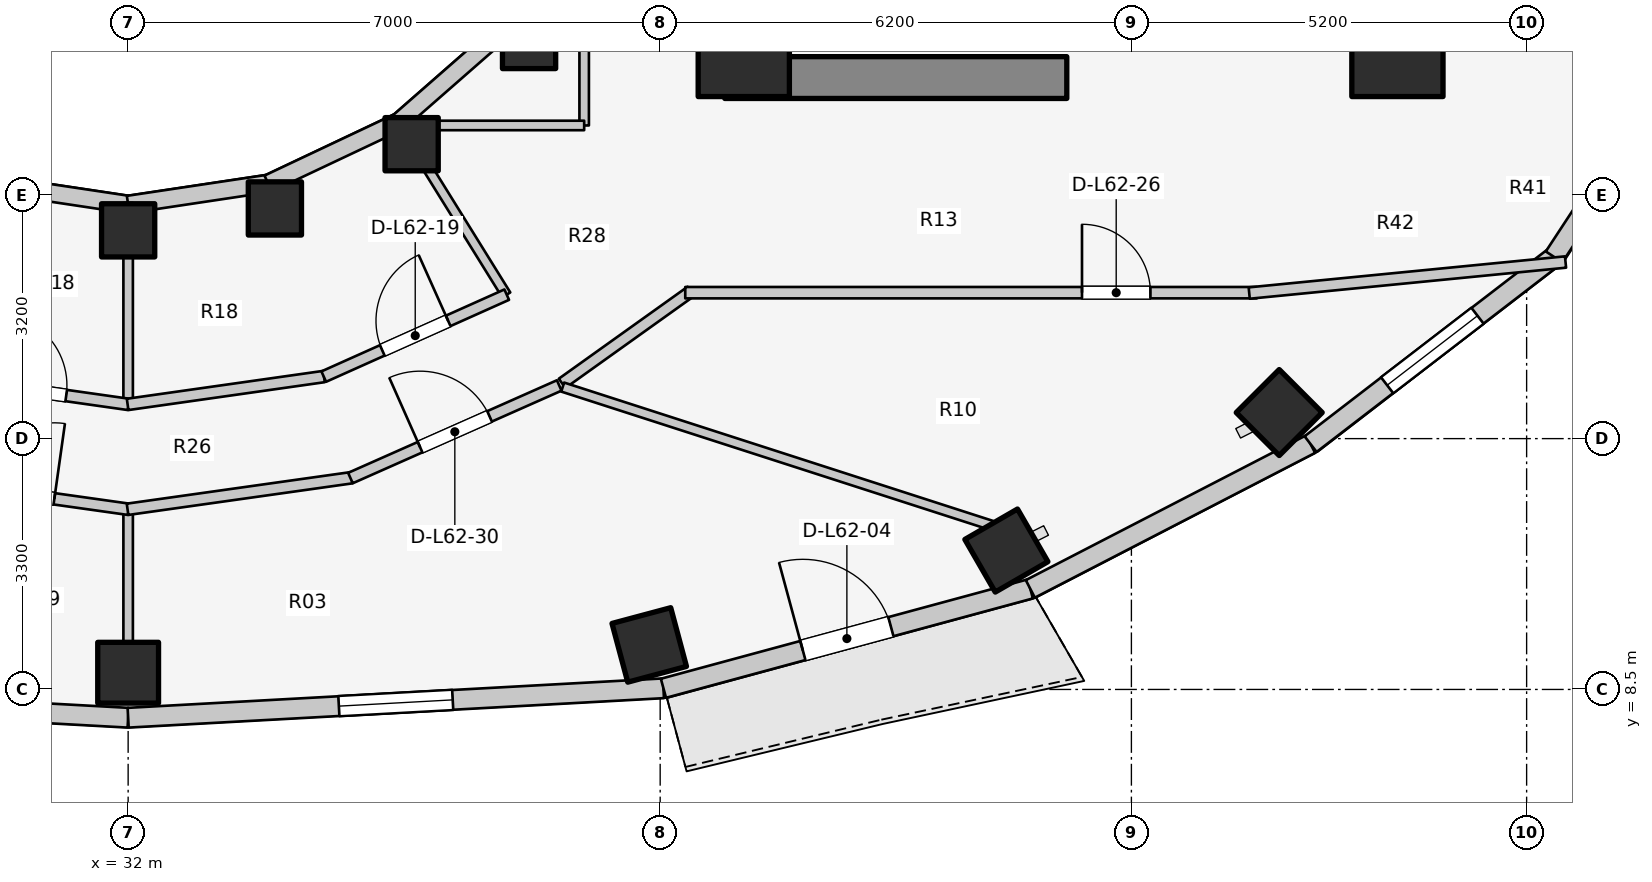
"""IFC4 building model, lengths in metres.
Left out: names, types, materials, properties, quantities, classifications, styles, units other than length and angle.
Written with IfcOpenShell. Run it as: python <this file> out.ifc"""

import sys

from ifc_helpers import new_model, si_unit, direction, frame, frame_2d, origin, origin_2d, place, context, subcontext, project, spatial, rectangle, extrude, element, fill, save


model = new_model("IFC4")
c1 = context("Model", 3, precision=1e-05, world=origin(), true_north=direction((0.0, 1.0)))
c2 = subcontext(c1, "Body", "Model", "MODEL_VIEW")
j1 = project(units=[si_unit("LENGTHUNIT", "METRE"), si_unit("PLANEANGLEUNIT", "RADIAN")], contexts=[c1])
p1 = place(None, origin())
s1 = spatial("IfcSite", under=j1, at=p1, CompositionType="ELEMENT")
p2 = place(p1, origin())
s2 = spatial("IfcBuilding", under=s1, at=p2, CompositionType="ELEMENT")
p3 = place(p2, frame((0.0, 0.0, 204.7)))
s3 = spatial("IfcBuildingStorey", under=s2, at=p3, CompositionType="ELEMENT", Elevation=204.7)
p4 = place(p3, frame((39.85, 16.55, 0.0), z_axis=(0.0, 0.0, 1.0), x_axis=(1.0, 0.0, 0.0)))
e1 = element("IfcWall", 1, at=p4, inside=s3, PredefinedType="SHEAR", context=c2, shape_type="SweptSolid", body=[
    extrude(rectangle(XDim=4.5, YDim=0.55, at=frame_2d((2.25, 0.0))), origin(), (0.0, 0.0, 1.0), 3.1),
])
for number, where, z_axis, x_axis in (
    (2, (40.1, 16.9, 0.0), (0.0, 0.0, 1.0), (1.0, 0.0, 0.0)),
    (3, (48.7, 16.9, 0.0), (0.0, 0.0, 1.0), (1.0, 0.0, 0.0)),
):
    element("IfcColumn", number, at=place(p3, frame(where, z_axis=z_axis, x_axis=x_axis)), inside=s3, PredefinedType="COLUMN", context=c2, shape_type="SweptSolid", body=[
        extrude(rectangle(XDim=1.2, YDim=1.2, at=origin_2d()), origin(), (0.0, 0.0, 1.0), 3.1),
    ])
p5 = place(p3, frame((32.0, 14.54, 0.0), z_axis=(0.0, 0.0, 1.0), x_axis=(1.0, 0.0, 0.0)))
e4 = element("IfcColumn", 4, at=p5, inside=s3, PredefinedType="COLUMN", context=c2, shape_type="SweptSolid", body=[
    extrude(rectangle(XDim=0.7, YDim=0.7, at=origin_2d()), origin(), (0.0, 0.0, 1.0), 3.1),
])
p6 = place(p3, frame((32.0, 8.72, 0.0), z_axis=(0.0, 0.0, 1.0), x_axis=(0.0, -1.0, 0.0)))
e5 = element("IfcColumn", 5, at=p6, inside=s3, PredefinedType="COLUMN", context=c2, shape_type="SweptSolid", body=[
    extrude(rectangle(XDim=0.8, YDim=0.8, at=origin_2d()), origin(), (0.0, 0.0, 1.0), 3.1),
])
p7 = place(p3, frame((33.931, 14.828, 0.0), z_axis=(0.0, 0.0, 1.0), x_axis=(1.0, 0.0, 0.0)))
e6 = element("IfcColumn", 6, at=p7, inside=s3, PredefinedType="COLUMN", context=c2, shape_type="SweptSolid", body=[
    extrude(rectangle(XDim=0.7, YDim=0.7, at=origin_2d()), origin(), (0.0, 0.0, 1.0), 3.1),
])
p8 = place(p3, frame((38.856, 9.086, 0.0), z_axis=(0.0, 0.0, 1.0), x_axis=(0.258819045103, -0.965925826289, 0.0)))
e7 = element("IfcColumn", 7, at=p8, inside=s3, PredefinedType="COLUMN", context=c2, shape_type="SweptSolid", body=[
    extrude(rectangle(XDim=0.8, YDim=0.8, at=origin_2d()), origin(), (0.0, 0.0, 1.0), 3.1),
])
p9 = place(p3, frame((35.73, 15.673, 0.0), z_axis=(0.0, 0.0, 1.0), x_axis=(1.0, 0.0, 0.0)))
e8 = element("IfcColumn", 8, at=p9, inside=s3, PredefinedType="COLUMN", context=c2, shape_type="SweptSolid", body=[
    extrude(rectangle(XDim=0.7, YDim=0.7, at=origin_2d()), origin(), (0.0, 0.0, 1.0), 3.1),
])
p10 = place(p3, frame((43.555, 10.327, 0.0), z_axis=(0.0, 0.0, 1.0), x_axis=(0.5, -0.866025403784, 0.0)))
e9 = element("IfcColumn", 9, at=p10, inside=s3, PredefinedType="COLUMN", context=c2, shape_type="SweptSolid", body=[
    extrude(rectangle(XDim=0.8, YDim=0.8, at=origin_2d()), origin(), (0.0, 0.0, 1.0), 3.1),
])
p11 = place(p3, frame((37.275, 17.018, 0.0), z_axis=(0.0, 0.0, 1.0), x_axis=(1.0, 0.0, 0.0)))
e10 = element("IfcColumn", 10, at=p11, inside=s3, PredefinedType="COLUMN", context=c2, shape_type="SweptSolid", body=[
    extrude(rectangle(XDim=0.7, YDim=0.7, at=origin_2d()), origin(), (0.0, 0.0, 1.0), 3.1),
])
p12 = place(p3, frame((47.145, 12.143, 0.0), z_axis=(0.0, 0.0, 1.0), x_axis=(0.707106781187, -0.707106781187, 0.0)))
e11 = element("IfcColumn", 11, at=p12, inside=s3, PredefinedType="COLUMN", context=c2, shape_type="SweptSolid", body=[
    extrude(rectangle(XDim=0.8, YDim=0.8, at=origin_2d()), origin(), (0.0, 0.0, 1.0), 3.1),
])
for number, where, z_axis, x_axis in (
    (12, (30.157, 15.157, 0.0), (0.0, 0.0, 1.0), (0.989, -0.149, 0.0)),
    (13, (32.0, 14.88, 0.0), (0.0, 0.0, 1.0), (0.989, 0.149, 0.0)),
):
    element("IfcWall", number, at=place(p3, frame(where, z_axis=z_axis, x_axis=x_axis)), inside=s3, PredefinedType="STANDARD", context=c2, shape_type="SweptSolid", body=[
        extrude(rectangle(XDim=1.864, YDim=0.23, at=frame_2d((0.932, 0.0))), origin(), (0.0, 0.0, 1.0), 2.16),
    ])
p13 = place(p3, frame((33.843, 15.157, 0.0), z_axis=(0.0, 0.0, 1.0), x_axis=(0.904179699603, 0.427152280606, 0.0)))
e14 = element("IfcWall", 14, at=p13, inside=s3, PredefinedType="STANDARD", context=c2, shape_type="SweptSolid", body=[
    extrude(rectangle(XDim=1.899, YDim=0.23, at=frame_2d((0.95, 0.0))), origin(), (0.0, 0.0, 1.0), 2.16),
])
p14 = place(p3, frame((35.56, 15.968, 0.0), z_axis=(0.0, 0.0, 1.0), x_axis=(0.752576694707, 0.658504607869, 0.0)))
e15 = element("IfcWall", 15, at=p14, inside=s3, PredefinedType="STANDARD", context=c2, shape_type="SweptSolid", body=[
    extrude(rectangle(XDim=1.959, YDim=0.23, at=frame_2d((0.98, 0.0))), origin(), (0.0, 0.0, 1.0), 2.16),
])
p15 = place(p3, frame((24.957, 8.515, 0.0), z_axis=(0.0, 0.0, 1.0), x_axis=(0.998490239527, -0.054929423535, 0.0)))
e16 = element("IfcWall", 16, at=p15, inside=s3, PredefinedType="STANDARD", context=c2, shape_type="SweptSolid", body=[
    extrude(rectangle(XDim=7.054, YDim=0.26, at=frame_2d((3.527, 0.0))), origin(), (0.0, 0.0, 1.0), 2.85),
])
p16 = place(p15, frame((2.777, 0.0, 0.75)))
e17 = element("IfcOpeningElement", 17, at=p16, cuts=e16, PredefinedType="OPENING", context=c2, shape_type="SweptSolid", body=[
    extrude(rectangle(XDim=1.5, YDim=1.6, at=frame_2d((0.75, 0.8))), frame((0.0, 0.14, 0.0), z_axis=(0.0, -1.0, 0.0), x_axis=(1.0, 0.0, 0.0)), (0.0, 0.0, 1.0), 0.28),
])
p17 = place(p3, frame((32.0, 8.128, 0.0), z_axis=(0.0, 0.0, 1.0), x_axis=(0.998490239527, 0.054929423535, 0.0)))
e18 = element("IfcWall", 18, at=p17, inside=s3, PredefinedType="STANDARD", context=c2, shape_type="SweptSolid", body=[
    extrude(rectangle(XDim=7.054, YDim=0.26, at=frame_2d((3.527, 0.0))), origin(), (0.0, 0.0, 1.0), 2.85),
])
p18 = place(p17, frame((2.777, 0.0, 0.75)))
e19 = element("IfcOpeningElement", 19, at=p18, cuts=e18, PredefinedType="OPENING", context=c2, shape_type="SweptSolid", body=[
    extrude(rectangle(XDim=1.5, YDim=1.6, at=frame_2d((0.75, 0.8))), frame((0.0, 0.14, 0.0), z_axis=(0.0, -1.0, 0.0), x_axis=(1.0, 0.0, 0.0)), (0.0, 0.0, 1.0), 0.28),
])
p19 = place(p3, frame((39.043, 8.515, 0.0), z_axis=(0.0, 0.0, 1.0), x_axis=(0.965213026382, 0.261464746576, 0.0)))
e20 = element("IfcWall", 20, at=p19, inside=s3, PredefinedType="STANDARD", context=c2, shape_type="SweptSolid", body=[
    extrude(rectangle(XDim=5.001, YDim=0.26, at=frame_2d((2.5, 0.0))), origin(), (0.0, 0.0, 1.0), 2.88),
])
p20 = place(p19, frame((1.9, 0.0, 0.0)))
e21 = element("IfcOpeningElement", 21, at=p20, cuts=e20, PredefinedType="OPENING", context=c2, shape_type="SweptSolid", body=[
    extrude(rectangle(XDim=1.2, YDim=2.2, at=frame_2d((0.6, 1.1))), frame((0.0, 0.14, 0.0), z_axis=(0.0, -1.0, 0.0), x_axis=(1.0, 0.0, 0.0)), (0.0, 0.0, 1.0), 0.28),
])
p21 = place(p3, frame((43.87, 9.823, 0.0), z_axis=(0.0, 0.0, 1.0), x_axis=(0.88849146803, 0.458893137057, 0.0)))
e22 = element("IfcWall", 22, at=p21, inside=s3, PredefinedType="STANDARD", context=c2, shape_type="SweptSolid", body=[
    extrude(rectangle(XDim=4.15, YDim=0.26, at=frame_2d((2.075, 0.0))), origin(), (0.0, 0.0, 1.0), 2.85),
])
p22 = place(p3, frame((47.558, 11.728, 0.0), z_axis=(0.0, 0.0, 1.0), x_axis=(0.792713817907, 0.609593965603, 0.0)))
e23 = element("IfcWall", 23, at=p22, inside=s3, PredefinedType="STANDARD", context=c2, shape_type="SweptSolid", body=[
    extrude(rectangle(XDim=4.041, YDim=0.26, at=frame_2d((2.021, 0.0))), origin(), (0.0, 0.0, 1.0), 2.85),
])
p23 = place(p22, frame((1.271, 0.0, 0.75)))
e24 = element("IfcOpeningElement", 24, at=p23, cuts=e23, PredefinedType="OPENING", context=c2, shape_type="SweptSolid", body=[
    extrude(rectangle(XDim=1.5, YDim=1.6, at=frame_2d((0.75, 0.8))), frame((0.0, 0.14, 0.0), z_axis=(0.0, -1.0, 0.0), x_axis=(1.0, 0.0, 0.0)), (0.0, 0.0, 1.0), 0.28),
])
p24 = place(p3, frame((50.761, 14.191, 0.0), z_axis=(0.0, 0.0, 1.0), x_axis=(0.548776305075, 0.835969238064, 0.0)))
e25 = element("IfcWall", 25, at=p24, inside=s3, PredefinedType="STANDARD", context=c2, shape_type="SweptSolid", body=[
    extrude(rectangle(XDim=4.271, YDim=0.26, at=frame_2d((2.135, 0.0))), origin(), (0.0, 0.0, 1.0), 2.85),
])
p25 = place(p24, frame((1.385, 0.0, 0.75)))
e26 = element("IfcOpeningElement", 26, at=p25, cuts=e25, PredefinedType="OPENING", context=c2, shape_type="SweptSolid", body=[
    extrude(rectangle(XDim=1.5, YDim=1.6, at=frame_2d((0.75, 0.8))), frame((0.0, 0.14, 0.0), z_axis=(0.0, -1.0, 0.0), x_axis=(1.0, 0.0, 0.0)), (0.0, 0.0, 1.0), 0.28),
])
p26 = place(p3, frame((32.0, 14.9, 0.0), z_axis=(0.0, 0.0, 1.0), x_axis=(0.0, -1.0, 0.0)))
e27 = element("IfcWall", 27, at=p26, inside=s3, PredefinedType="PARTITIONING", context=c2, shape_type="SweptSolid", body=[
    extrude(rectangle(XDim=2.65, YDim=0.125, at=frame_2d((1.325, 0.0))), origin(), (0.0, 0.0, 1.0), 2.376),
])
p27 = place(p3, frame((35.55, 15.985, 0.0), z_axis=(0.0, 0.0, 1.0), x_axis=(0.527527080983, -0.849538215049, 0.0)))
e28 = element("IfcWall", 28, at=p27, inside=s3, PredefinedType="PARTITIONING", context=c2, shape_type="SweptSolid", body=[
    extrude(rectangle(XDim=2.701, YDim=0.125, at=frame_2d((1.351, 0.0))), origin(), (0.0, 0.0, 1.0), 2.376),
])
p28 = place(p3, frame((29.423, 12.617, 0.0), z_axis=(0.0, 0.0, 1.0), x_axis=(0.990078185178, -0.140517569133, 0.0)))
e29 = element("IfcWall", 29, at=p28, inside=s3, PredefinedType="PARTITIONING", context=c2, shape_type="SweptSolid", body=[
    extrude(rectangle(XDim=2.61, YDim=0.15, at=frame_2d((1.305, 0.0))), origin(), (0.0, 0.0, 1.0), 2.376),
])
p29 = place(p28, frame((0.83, 0.0, 0.0)))
e30 = element("IfcOpeningElement", 30, at=p29, cuts=e29, PredefinedType="OPENING", context=c2, shape_type="SweptSolid", body=[
    extrude(rectangle(XDim=0.95, YDim=2.1, at=frame_2d((0.475, 1.05))), frame((0.0, 0.085, 0.0), z_axis=(0.0, -1.0, 0.0), x_axis=(1.0, 0.0, 0.0)), (0.0, 0.0, 1.0), 0.17),
])
p30 = place(p3, frame((31.993, 12.25, 0.0), z_axis=(0.0, 0.0, 1.0), x_axis=(0.990078185178, 0.140517569133, 0.0)))
e31 = element("IfcWall", 31, at=p30, inside=s3, PredefinedType="PARTITIONING", context=c2, shape_type="SweptSolid", body=[
    extrude(rectangle(XDim=2.61, YDim=0.15, at=frame_2d((1.305, 0.0))), origin(), (0.0, 0.0, 1.0), 2.376),
])
p31 = place(p3, frame((34.573, 12.616, 0.0), z_axis=(0.0, 0.0, 1.0), x_axis=(0.912628408652, 0.408790151203, 0.0)))
e32 = element("IfcWall", 32, at=p31, inside=s3, PredefinedType="PARTITIONING", context=c2, shape_type="SweptSolid", body=[
    extrude(rectangle(XDim=2.638, YDim=0.15, at=frame_2d((1.319, 0.0))), origin(), (0.0, 0.0, 1.0), 2.376),
])
p32 = place(p31, frame((0.844, 0.0, 0.0)))
e33 = element("IfcOpeningElement", 33, at=p32, cuts=e32, PredefinedType="OPENING", context=c2, shape_type="SweptSolid", body=[
    extrude(rectangle(XDim=0.95, YDim=2.1, at=frame_2d((0.475, 1.05))), frame((0.0, 0.085, 0.0), z_axis=(0.0, -1.0, 0.0), x_axis=(1.0, 0.0, 0.0)), (0.0, 0.0, 1.0), 0.17),
])
p33 = place(p3, frame((38.0, 15.92, 0.0), z_axis=(0.0, 0.0, 1.0), x_axis=(0.0, 1.0, 0.0)))
e34 = element("IfcWall", 34, at=p33, inside=s3, PredefinedType="PARTITIONING", context=c2, shape_type="SweptSolid", body=[
    extrude(rectangle(XDim=4.28, YDim=0.125, at=frame_2d((2.14, 0.0))), origin(), (0.0, 0.0, 1.0), 2.232),
])
p34 = place(p3, frame((35.4, 15.92, 0.0), z_axis=(0.0, 0.0, 1.0), x_axis=(1.0, 0.0, 0.0)))
e35 = element("IfcWall", 35, at=p34, inside=s3, PredefinedType="PARTITIONING", context=c2, shape_type="SweptSolid", body=[
    extrude(rectangle(XDim=2.6, YDim=0.125, at=frame_2d((1.3, 0.0))), origin(), (0.0, 0.0, 1.0), 2.232),
])
p35 = place(p3, frame((37.71, 12.527, 0.0), z_axis=(0.0, 0.0, 1.0), x_axis=(0.813780999276, 0.581171648669, 0.0)))
e36 = element("IfcWall", 36, at=p35, inside=s3, PredefinedType="PARTITIONING", context=c2, shape_type="SweptSolid", body=[
    extrude(rectangle(XDim=2.082, YDim=0.15, at=frame_2d((1.041, 0.0))), origin(), (0.0, 0.0, 1.0), 2.376),
])
p36 = place(p3, frame((39.33, 13.72, 0.0), z_axis=(0.0, 0.0, 1.0), x_axis=(1.0, 0.0, 0.0)))
e37 = element("IfcWall", 37, at=p36, inside=s3, PredefinedType="PARTITIONING", context=c2, shape_type="SweptSolid", body=[
    extrude(rectangle(XDim=7.52, YDim=0.15, at=frame_2d((3.76, 0.0))), origin(), (0.0, 0.0, 1.0), 2.376),
])
p37 = place(p36, frame((5.22, 0.0, 0.0)))
e38 = element("IfcOpeningElement", 38, at=p37, cuts=e37, PredefinedType="OPENING", context=c2, shape_type="SweptSolid", body=[
    extrude(rectangle(XDim=0.9, YDim=2.1, at=frame_2d((0.45, 1.05))), frame((0.0, 0.085, 0.0), z_axis=(0.0, -1.0, 0.0), x_axis=(1.0, 0.0, 0.0)), (0.0, 0.0, 1.0), 0.17),
])
p38 = place(p3, frame((46.75, 13.715, 0.0), z_axis=(0.0, 0.0, 1.0), x_axis=(0.995223854991, 0.097619047609, 0.0)))
e39 = element("IfcWall", 39, at=p38, inside=s3, PredefinedType="PARTITIONING", context=c2, shape_type="SweptSolid", body=[
    extrude(rectangle(XDim=4.182, YDim=0.15, at=frame_2d((2.091, 0.0))), origin(), (0.0, 0.0, 1.0), 2.22),
])
p39 = place(p3, frame((32.0, 10.815, 0.0), z_axis=(0.0, 0.0, 1.0), x_axis=(0.0, -1.0, 0.0)))
e40 = element("IfcWall", 40, at=p39, inside=s3, PredefinedType="PARTITIONING", context=c2, shape_type="SweptSolid", body=[
    extrude(rectangle(XDim=1.715, YDim=0.125, at=frame_2d((0.857, 0.0))), origin(), (0.0, 0.0, 1.0), 2.376),
])
p40 = place(p3, frame((37.717, 12.478, 0.0), z_axis=(0.0, 0.0, 1.0), x_axis=(0.951711719757, -0.306993163568, 0.0)))
e41 = element("IfcWall", 41, at=p40, inside=s3, PredefinedType="PARTITIONING", context=c2, shape_type="SweptSolid", body=[
    extrude(rectangle(XDim=5.934, YDim=0.125, at=frame_2d((2.967, 0.0))), origin(), (0.0, 0.0, 1.0), 2.376),
])
p41 = place(p3, frame((29.06, 11.285, 0.0), z_axis=(0.0, 0.0, 1.0), x_axis=(0.99022315503, -0.139492305317, 0.0)))
e42 = element("IfcWall", 42, at=p41, inside=s3, PredefinedType="PARTITIONING", context=c2, shape_type="SweptSolid", body=[
    extrude(rectangle(XDim=2.977, YDim=0.15, at=frame_2d((1.489, 0.0))), origin(), (0.0, 0.0, 1.0), 2.376),
])
p42 = place(p41, frame((0.989, 0.0, 0.0)))
e43 = element("IfcOpeningElement", 43, at=p42, cuts=e42, PredefinedType="OPENING", context=c2, shape_type="SweptSolid", body=[
    extrude(rectangle(XDim=1.0, YDim=2.1, at=frame_2d((0.5, 1.05))), frame((0.0, 0.085, 0.0), z_axis=(0.0, -1.0, 0.0), x_axis=(1.0, 0.0, 0.0)), (0.0, 0.0, 1.0), 0.17),
])
p43 = place(p3, frame((31.992, 10.87, 0.0), z_axis=(0.0, 0.0, 1.0), x_axis=(0.99022315503, 0.139492305317, 0.0)))
e44 = element("IfcWall", 44, at=p43, inside=s3, PredefinedType="PARTITIONING", context=c2, shape_type="SweptSolid", body=[
    extrude(rectangle(XDim=2.977, YDim=0.15, at=frame_2d((1.489, 0.0))), origin(), (0.0, 0.0, 1.0), 2.376),
])
p44 = place(p3, frame((34.925, 11.281, 0.0), z_axis=(0.0, 0.0, 1.0), x_axis=(0.914139569865, 0.405399613724, 0.0)))
e45 = element("IfcWall", 45, at=p44, inside=s3, PredefinedType="PARTITIONING", context=c2, shape_type="SweptSolid", body=[
    extrude(rectangle(XDim=3.005, YDim=0.15, at=frame_2d((1.502, 0.0))), origin(), (0.0, 0.0, 1.0), 2.376),
])
p45 = place(p44, frame((1.002, 0.0, 0.0)))
e46 = element("IfcOpeningElement", 46, at=p45, cuts=e45, PredefinedType="OPENING", context=c2, shape_type="SweptSolid", body=[
    extrude(rectangle(XDim=1.0, YDim=2.1, at=frame_2d((0.5, 1.05))), frame((0.0, 0.085, 0.0), z_axis=(0.0, -1.0, 0.0), x_axis=(1.0, 0.0, 0.0)), (0.0, 0.0, 1.0), 0.17),
])
p46 = place(p18, origin())
e47 = element("IfcWindow", 47, at=p46, inside=s3, PartitioningType="SINGLE_PANEL", PredefinedType="WINDOW", context=c2, shape_type="SweptSolid", body=[
    extrude(rectangle(XDim=1.5, YDim=1.6, at=frame_2d((0.75, 0.8))), frame((0.0, 0.03, 0.0), z_axis=(0.0, -1.0, 0.0), x_axis=(1.0, 0.0, 0.0)), (0.0, 0.0, 1.0), 0.06),
])
fill(e19, e47)
p47 = place(p20, origin())
e48 = element("IfcDoor", 48, at=p47, inside=s3, OperationType="SINGLE_SWING_LEFT", PredefinedType="DOOR", context=c2, shape_type="SweptSolid", body=[
    extrude(rectangle(XDim=1.2, YDim=2.2, at=frame_2d((0.6, 1.1))), frame((0.0, 0.025, 0.0), z_axis=(0.0, -1.0, 0.0), x_axis=(1.0, 0.0, 0.0)), (0.0, 0.0, 1.0), 0.05),
])
fill(e21, e48)
p48 = place(p23, origin())
e49 = element("IfcWindow", 49, at=p48, inside=s3, PartitioningType="SINGLE_PANEL", PredefinedType="WINDOW", context=c2, shape_type="SweptSolid", body=[
    extrude(rectangle(XDim=1.5, YDim=1.6, at=frame_2d((0.75, 0.8))), frame((0.0, 0.03, 0.0), z_axis=(0.0, -1.0, 0.0), x_axis=(1.0, 0.0, 0.0)), (0.0, 0.0, 1.0), 0.06),
])
fill(e24, e49)
p49 = place(p29, origin())
e50 = element("IfcDoor", 50, at=p49, inside=s3, OperationType="SINGLE_SWING_LEFT", PredefinedType="DOOR", context=c2, shape_type="SweptSolid", body=[
    extrude(rectangle(XDim=0.95, YDim=2.1, at=frame_2d((0.475, 1.05))), frame((0.0, 0.025, 0.0), z_axis=(0.0, -1.0, 0.0), x_axis=(1.0, 0.0, 0.0)), (0.0, 0.0, 1.0), 0.05),
])
fill(e30, e50)
p50 = place(p32, origin())
e51 = element("IfcDoor", 51, at=p50, inside=s3, OperationType="SINGLE_SWING_RIGHT", PredefinedType="DOOR", context=c2, shape_type="SweptSolid", body=[
    extrude(rectangle(XDim=0.95, YDim=2.1, at=frame_2d((0.475, 1.05))), frame((0.0, 0.025, 0.0), z_axis=(0.0, -1.0, 0.0), x_axis=(1.0, 0.0, 0.0)), (0.0, 0.0, 1.0), 0.05),
])
fill(e33, e51)
p51 = place(p37, origin())
e52 = element("IfcDoor", 52, at=p51, inside=s3, OperationType="SINGLE_SWING_LEFT", PredefinedType="DOOR", context=c2, shape_type="SweptSolid", body=[
    extrude(rectangle(XDim=0.9, YDim=2.1, at=frame_2d((0.45, 1.05))), frame((0.0, 0.025, 0.0), z_axis=(0.0, -1.0, 0.0), x_axis=(1.0, 0.0, 0.0)), (0.0, 0.0, 1.0), 0.05),
])
fill(e38, e52)
p52 = place(p42, origin())
e53 = element("IfcDoor", 53, at=p52, inside=s3, OperationType="SINGLE_SWING_RIGHT", PredefinedType="DOOR", context=c2, shape_type="SweptSolid", body=[
    extrude(rectangle(XDim=1.0, YDim=2.1, at=frame_2d((0.5, 1.05))), frame((0.0, 0.025, 0.0), z_axis=(0.0, -1.0, 0.0), x_axis=(1.0, 0.0, 0.0)), (0.0, 0.0, 1.0), 0.05),
])
fill(e43, e53)
p53 = place(p45, origin())
e54 = element("IfcDoor", 54, at=p53, inside=s3, OperationType="SINGLE_SWING_LEFT", PredefinedType="DOOR", context=c2, shape_type="SweptSolid", body=[
    extrude(rectangle(XDim=1.0, YDim=2.1, at=frame_2d((0.5, 1.05))), frame((0.0, 0.025, 0.0), z_axis=(0.0, -1.0, 0.0), x_axis=(1.0, 0.0, 0.0)), (0.0, 0.0, 1.0), 0.05),
])
fill(e46, e54)
save(model, sys.argv[1])
